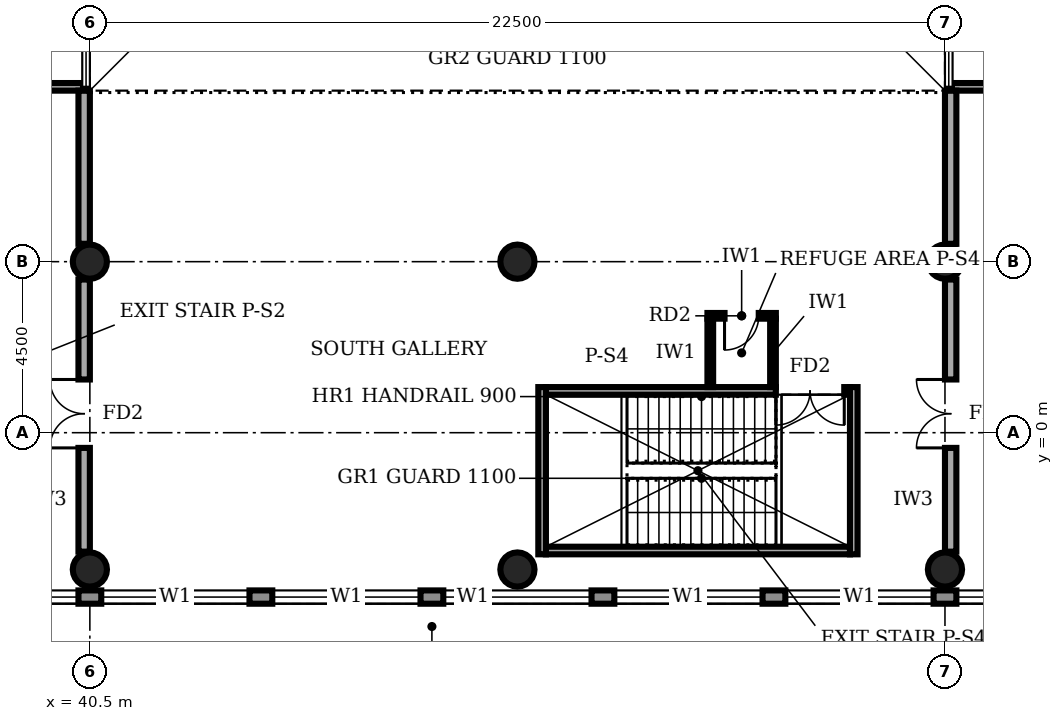
"""IFC4 building model, lengths in metres.
Left out: names, types, materials, properties, quantities, classifications, styles, units other than length and angle.
Written with IfcOpenShell. Run it as: python <this file> out.ifc"""

import sys

from ifc_helpers import new_model, si_unit, direction, frame, frame_2d, origin, origin_2d, place, context, subcontext, project, spatial, rectangle, circle, extrude, element, fill, save


model = new_model("IFC4")
c1 = context("Model", 3, precision=1e-05, world=origin(), true_north=direction((0.0, 1.0)))
c2 = subcontext(c1, "Body", "Model", "MODEL_VIEW")
j1 = project(units=[si_unit("LENGTHUNIT", "METRE"), si_unit("PLANEANGLEUNIT", "RADIAN")], contexts=[c1])
p1 = place(None, origin())
s1 = spatial("IfcSite", under=j1, at=p1, CompositionType="ELEMENT")
p2 = place(p1, origin())
s2 = spatial("IfcBuilding", under=s1, at=p2, CompositionType="ELEMENT")
p3 = place(p2, frame((0.0, 0.0, 11.0)))
s3 = spatial("IfcBuildingStorey", under=s2, at=p3, CompositionType="ELEMENT", Elevation=11.0)
for number, where, z_axis, x_axis in (
    (1, (40.5, -3.6, 0.0), (0.0, 0.0, 1.0), (1.0, 0.0, 0.0)),
    (2, (51.75, -3.6, 0.0), (0.0, 0.0, 1.0), (1.0, 0.0, 0.0)),
    (3, (63.0, -3.6, 0.0), (0.0, 0.0, 1.0), (1.0, 0.0, 0.0)),
    (4, (40.5, 4.5, 0.0), (0.0, 0.0, 1.0), (1.0, 0.0, 0.0)),
    (5, (51.75, 4.5, 0.0), (0.0, 0.0, 1.0), (1.0, 0.0, 0.0)),
    (6, (63.0, 4.5, 0.0), (0.0, 0.0, 1.0), (1.0, 0.0, 0.0)),
):
    element("IfcColumn", number, at=place(p3, frame(where, z_axis=z_axis, x_axis=x_axis)), inside=s3, PredefinedType="COLUMN", context=c2, shape_type="SweptSolid", body=[
        extrude(circle(Radius=0.45, at=origin_2d()), origin(), (0.0, 0.0, 1.0), 5.0),
    ])
p4 = place(p3, frame((0.02, -4.325, 0.0), z_axis=(0.0, 0.0, 1.0), x_axis=(1.0, 0.0, 0.0)))
e7 = element("IfcWall", 7, at=p4, inside=s3, PredefinedType="STANDARD", context=c2, shape_type="SweptSolid", body=[
    extrude(rectangle(XDim=98.96, YDim=0.35, at=frame_2d((49.48, 0.0))), origin(), (0.0, 0.0, 1.0), 4.7),
])
p5 = place(p4, frame((4.78, 0.0, 0.9)))
e8 = element("IfcOpeningElement", 8, at=p5, cuts=e7, PredefinedType="OPENING", context=c2, shape_type="SweptSolid", body=[
    extrude(rectangle(XDim=3.9, YDim=2.2, at=frame_2d((1.95, 1.1))), frame((0.0, 0.185, 0.0), z_axis=(0.0, -1.0, 0.0), x_axis=(1.0, 0.0, 0.0)), (0.0, 0.0, 1.0), 0.37),
])
p6 = place(p4, frame((9.28, 0.0, 0.9)))
e9 = element("IfcOpeningElement", 9, at=p6, cuts=e7, PredefinedType="OPENING", context=c2, shape_type="SweptSolid", body=[
    extrude(rectangle(XDim=3.9, YDim=2.2, at=frame_2d((1.95, 1.1))), frame((0.0, 0.185, 0.0), z_axis=(0.0, -1.0, 0.0), x_axis=(1.0, 0.0, 0.0)), (0.0, 0.0, 1.0), 0.37),
])
p7 = place(p4, frame((13.78, 0.0, 0.9)))
e10 = element("IfcOpeningElement", 10, at=p7, cuts=e7, PredefinedType="OPENING", context=c2, shape_type="SweptSolid", body=[
    extrude(rectangle(XDim=3.9, YDim=2.2, at=frame_2d((1.95, 1.1))), frame((0.0, 0.185, 0.0), z_axis=(0.0, -1.0, 0.0), x_axis=(1.0, 0.0, 0.0)), (0.0, 0.0, 1.0), 0.37),
])
p8 = place(p4, frame((18.28, 0.0, 0.9)))
e11 = element("IfcOpeningElement", 11, at=p8, cuts=e7, PredefinedType="OPENING", context=c2, shape_type="SweptSolid", body=[
    extrude(rectangle(XDim=3.9, YDim=2.2, at=frame_2d((1.95, 1.1))), frame((0.0, 0.185, 0.0), z_axis=(0.0, -1.0, 0.0), x_axis=(1.0, 0.0, 0.0)), (0.0, 0.0, 1.0), 0.37),
])
p9 = place(p4, frame((22.78, 0.0, 0.9)))
e12 = element("IfcOpeningElement", 12, at=p9, cuts=e7, PredefinedType="OPENING", context=c2, shape_type="SweptSolid", body=[
    extrude(rectangle(XDim=3.9, YDim=2.2, at=frame_2d((1.95, 1.1))), frame((0.0, 0.185, 0.0), z_axis=(0.0, -1.0, 0.0), x_axis=(1.0, 0.0, 0.0)), (0.0, 0.0, 1.0), 0.37),
])
p10 = place(p4, frame((27.28, 0.0, 0.9)))
e13 = element("IfcOpeningElement", 13, at=p10, cuts=e7, PredefinedType="OPENING", context=c2, shape_type="SweptSolid", body=[
    extrude(rectangle(XDim=3.9, YDim=2.2, at=frame_2d((1.95, 1.1))), frame((0.0, 0.185, 0.0), z_axis=(0.0, -1.0, 0.0), x_axis=(1.0, 0.0, 0.0)), (0.0, 0.0, 1.0), 0.37),
])
p11 = place(p4, frame((31.78, 0.0, 0.9)))
e14 = element("IfcOpeningElement", 14, at=p11, cuts=e7, PredefinedType="OPENING", context=c2, shape_type="SweptSolid", body=[
    extrude(rectangle(XDim=3.9, YDim=2.2, at=frame_2d((1.95, 1.1))), frame((0.0, 0.185, 0.0), z_axis=(0.0, -1.0, 0.0), x_axis=(1.0, 0.0, 0.0)), (0.0, 0.0, 1.0), 0.37),
])
p12 = place(p4, frame((36.28, 0.0, 0.9)))
e15 = element("IfcOpeningElement", 15, at=p12, cuts=e7, PredefinedType="OPENING", context=c2, shape_type="SweptSolid", body=[
    extrude(rectangle(XDim=3.9, YDim=2.2, at=frame_2d((1.95, 1.1))), frame((0.0, 0.185, 0.0), z_axis=(0.0, -1.0, 0.0), x_axis=(1.0, 0.0, 0.0)), (0.0, 0.0, 1.0), 0.37),
])
p13 = place(p4, frame((40.78, 0.0, 0.9)))
e16 = element("IfcOpeningElement", 16, at=p13, cuts=e7, PredefinedType="OPENING", context=c2, shape_type="SweptSolid", body=[
    extrude(rectangle(XDim=3.9, YDim=2.2, at=frame_2d((1.95, 1.1))), frame((0.0, 0.185, 0.0), z_axis=(0.0, -1.0, 0.0), x_axis=(1.0, 0.0, 0.0)), (0.0, 0.0, 1.0), 0.37),
])
p14 = place(p4, frame((45.28, 0.0, 0.9)))
e17 = element("IfcOpeningElement", 17, at=p14, cuts=e7, PredefinedType="OPENING", context=c2, shape_type="SweptSolid", body=[
    extrude(rectangle(XDim=3.9, YDim=2.2, at=frame_2d((1.95, 1.1))), frame((0.0, 0.185, 0.0), z_axis=(0.0, -1.0, 0.0), x_axis=(1.0, 0.0, 0.0)), (0.0, 0.0, 1.0), 0.37),
])
p15 = place(p4, frame((49.78, 0.0, 0.9)))
e18 = element("IfcOpeningElement", 18, at=p15, cuts=e7, PredefinedType="OPENING", context=c2, shape_type="SweptSolid", body=[
    extrude(rectangle(XDim=3.9, YDim=2.2, at=frame_2d((1.95, 1.1))), frame((0.0, 0.185, 0.0), z_axis=(0.0, -1.0, 0.0), x_axis=(1.0, 0.0, 0.0)), (0.0, 0.0, 1.0), 0.37),
])
p16 = place(p4, frame((54.28, 0.0, 0.9)))
e19 = element("IfcOpeningElement", 19, at=p16, cuts=e7, PredefinedType="OPENING", context=c2, shape_type="SweptSolid", body=[
    extrude(rectangle(XDim=3.9, YDim=2.2, at=frame_2d((1.95, 1.1))), frame((0.0, 0.185, 0.0), z_axis=(0.0, -1.0, 0.0), x_axis=(1.0, 0.0, 0.0)), (0.0, 0.0, 1.0), 0.37),
])
p17 = place(p4, frame((58.78, 0.0, 0.9)))
e20 = element("IfcOpeningElement", 20, at=p17, cuts=e7, PredefinedType="OPENING", context=c2, shape_type="SweptSolid", body=[
    extrude(rectangle(XDim=3.9, YDim=2.2, at=frame_2d((1.95, 1.1))), frame((0.0, 0.185, 0.0), z_axis=(0.0, -1.0, 0.0), x_axis=(1.0, 0.0, 0.0)), (0.0, 0.0, 1.0), 0.37),
])
p18 = place(p4, frame((63.28, 0.0, 0.9)))
e21 = element("IfcOpeningElement", 21, at=p18, cuts=e7, PredefinedType="OPENING", context=c2, shape_type="SweptSolid", body=[
    extrude(rectangle(XDim=3.9, YDim=2.2, at=frame_2d((1.95, 1.1))), frame((0.0, 0.185, 0.0), z_axis=(0.0, -1.0, 0.0), x_axis=(1.0, 0.0, 0.0)), (0.0, 0.0, 1.0), 0.37),
])
p19 = place(p4, frame((67.78, 0.0, 0.9)))
e22 = element("IfcOpeningElement", 22, at=p19, cuts=e7, PredefinedType="OPENING", context=c2, shape_type="SweptSolid", body=[
    extrude(rectangle(XDim=3.9, YDim=2.2, at=frame_2d((1.95, 1.1))), frame((0.0, 0.185, 0.0), z_axis=(0.0, -1.0, 0.0), x_axis=(1.0, 0.0, 0.0)), (0.0, 0.0, 1.0), 0.37),
])
p20 = place(p4, frame((72.28, 0.0, 0.9)))
e23 = element("IfcOpeningElement", 23, at=p20, cuts=e7, PredefinedType="OPENING", context=c2, shape_type="SweptSolid", body=[
    extrude(rectangle(XDim=3.9, YDim=2.2, at=frame_2d((1.95, 1.1))), frame((0.0, 0.185, 0.0), z_axis=(0.0, -1.0, 0.0), x_axis=(1.0, 0.0, 0.0)), (0.0, 0.0, 1.0), 0.37),
])
p21 = place(p4, frame((76.78, 0.0, 0.9)))
e24 = element("IfcOpeningElement", 24, at=p21, cuts=e7, PredefinedType="OPENING", context=c2, shape_type="SweptSolid", body=[
    extrude(rectangle(XDim=3.9, YDim=2.2, at=frame_2d((1.95, 1.1))), frame((0.0, 0.185, 0.0), z_axis=(0.0, -1.0, 0.0), x_axis=(1.0, 0.0, 0.0)), (0.0, 0.0, 1.0), 0.37),
])
p22 = place(p4, frame((81.28, 0.0, 0.9)))
e25 = element("IfcOpeningElement", 25, at=p22, cuts=e7, PredefinedType="OPENING", context=c2, shape_type="SweptSolid", body=[
    extrude(rectangle(XDim=3.9, YDim=2.2, at=frame_2d((1.95, 1.1))), frame((0.0, 0.185, 0.0), z_axis=(0.0, -1.0, 0.0), x_axis=(1.0, 0.0, 0.0)), (0.0, 0.0, 1.0), 0.37),
])
p23 = place(p4, frame((85.78, 0.0, 0.9)))
e26 = element("IfcOpeningElement", 26, at=p23, cuts=e7, PredefinedType="OPENING", context=c2, shape_type="SweptSolid", body=[
    extrude(rectangle(XDim=3.9, YDim=2.2, at=frame_2d((1.95, 1.1))), frame((0.0, 0.185, 0.0), z_axis=(0.0, -1.0, 0.0), x_axis=(1.0, 0.0, 0.0)), (0.0, 0.0, 1.0), 0.37),
])
p24 = place(p4, frame((90.28, 0.0, 0.9)))
e27 = element("IfcOpeningElement", 27, at=p24, cuts=e7, PredefinedType="OPENING", context=c2, shape_type="SweptSolid", body=[
    extrude(rectangle(XDim=3.9, YDim=2.2, at=frame_2d((1.95, 1.1))), frame((0.0, 0.185, 0.0), z_axis=(0.0, -1.0, 0.0), x_axis=(1.0, 0.0, 0.0)), (0.0, 0.0, 1.0), 0.37),
])
p25 = place(p4, frame((94.71, 0.0, 0.9)))
e28 = element("IfcOpeningElement", 28, at=p25, cuts=e7, PredefinedType="OPENING", context=c2, shape_type="SweptSolid", body=[
    extrude(rectangle(XDim=3.9, YDim=2.2, at=frame_2d((1.95, 1.1))), frame((0.0, 0.185, 0.0), z_axis=(0.0, -1.0, 0.0), x_axis=(1.0, 0.0, 0.0)), (0.0, 0.0, 1.0), 0.37),
])
p26 = place(p3, frame((28.8, 9.1, 0.0), z_axis=(0.0, 0.0, 1.0), x_axis=(1.0, 0.0, 0.0)))
e29 = element("IfcWall", 29, at=p26, inside=s3, PredefinedType="SOLIDWALL", context=c2, shape_type="SweptSolid", body=[
    extrude(rectangle(XDim=11.52, YDim=0.2, at=frame_2d((5.76, 0.0))), origin(), (0.0, 0.0, 1.0), 4.7),
])
p27 = place(p3, frame((63.18, 9.1, 0.0), z_axis=(0.0, 0.0, 1.0), x_axis=(1.0, 0.0, 0.0)))
e30 = element("IfcWall", 30, at=p27, inside=s3, PredefinedType="SOLIDWALL", context=c2, shape_type="SweptSolid", body=[
    extrude(rectangle(XDim=9.27, YDim=0.2, at=frame_2d((4.635, 0.0))), origin(), (0.0, 0.0, 1.0), 4.7),
])
p28 = place(p3, frame((52.5, 1.1, 0.0), z_axis=(0.0, 0.0, 1.0), x_axis=(1.0, 0.0, 0.0)))
e31 = element("IfcWall", 31, at=p28, inside=s3, PredefinedType="SOLIDWALL", context=c2, shape_type="SweptSolid", body=[
    extrude(rectangle(XDim=8.0, YDim=0.2, at=frame_2d((4.0, 0.0))), origin(), (0.0, 0.0, 1.0), 4.7),
])
p29 = place(p28, frame((6.05, 0.0, 0.0)))
e32 = element("IfcOpeningElement", 32, at=p29, cuts=e31, PredefinedType="OPENING", context=c2, shape_type="SweptSolid", body=[
    extrude(rectangle(XDim=1.8, YDim=2.1, at=frame_2d((0.9, 1.05))), frame((0.0, 0.11, 0.0), z_axis=(0.0, -1.0, 0.0), x_axis=(1.0, 0.0, 0.0)), (0.0, 0.0, 1.0), 0.22),
])
p30 = place(p3, frame((52.5, -3.1, 0.0), z_axis=(0.0, 0.0, 1.0), x_axis=(1.0, 0.0, 0.0)))
e33 = element("IfcWall", 33, at=p30, inside=s3, PredefinedType="SOLIDWALL", context=c2, shape_type="SweptSolid", body=[
    extrude(rectangle(XDim=8.0, YDim=0.2, at=frame_2d((4.0, 0.0))), origin(), (0.0, 0.0, 1.0), 4.7),
])
for number, where, z_axis, x_axis in (
    (34, (52.4, -3.2, 0.0), (0.0, 0.0, 1.0), (0.0, 1.0, 0.0)),
    (35, (60.6, -3.2, 0.0), (0.0, 0.0, 1.0), (0.0, 1.0, 0.0)),
):
    element("IfcWall", number, at=place(p3, frame(where, z_axis=z_axis, x_axis=x_axis)), inside=s3, PredefinedType="SOLIDWALL", context=c2, shape_type="SweptSolid", body=[
        extrude(rectangle(XDim=4.4, YDim=0.2, at=frame_2d((2.2, 0.0))), origin(), (0.0, 0.0, 1.0), 4.7),
    ])
p31 = place(p3, frame((40.35, -3.13, 0.0), z_axis=(0.0, 0.0, 1.0), x_axis=(0.0, 1.0, 0.0)))
e36 = element("IfcWall", 36, at=p31, inside=s3, PredefinedType="SOLIDWALL", context=c2, shape_type="SweptSolid", body=[
    extrude(rectangle(XDim=7.16, YDim=0.3, at=frame_2d((3.58, 0.0))), origin(), (0.0, 0.0, 1.0), 3.7),
])
p32 = place(p31, frame((2.73, 0.0, 0.0)))
e37 = element("IfcOpeningElement", 37, at=p32, cuts=e36, PredefinedType="OPENING", context=c2, shape_type="SweptSolid", body=[
    extrude(rectangle(XDim=1.8, YDim=2.1, at=frame_2d((0.9, 1.05))), frame((0.0, 0.16, 0.0), z_axis=(0.0, -1.0, 0.0), x_axis=(1.0, 0.0, 0.0)), (0.0, 0.0, 1.0), 0.32),
])
p33 = place(p3, frame((40.35, 4.97, 0.0), z_axis=(0.0, 0.0, 1.0), x_axis=(0.0, 1.0, 0.0)))
e38 = element("IfcWall", 38, at=p33, inside=s3, PredefinedType="SOLIDWALL", context=c2, shape_type="SweptSolid", body=[
    extrude(rectangle(XDim=4.03, YDim=0.3, at=frame_2d((2.015, 0.0))), origin(), (0.0, 0.0, 1.0), 4.7),
])
p34 = place(p3, frame((63.15, -3.13, 0.0), z_axis=(0.0, 0.0, 1.0), x_axis=(0.0, 1.0, 0.0)))
e39 = element("IfcWall", 39, at=p34, inside=s3, PredefinedType="SOLIDWALL", context=c2, shape_type="SweptSolid", body=[
    extrude(rectangle(XDim=7.16, YDim=0.3, at=frame_2d((3.58, 0.0))), origin(), (0.0, 0.0, 1.0), 3.7),
])
p35 = place(p34, frame((2.73, 0.0, 0.0)))
e40 = element("IfcOpeningElement", 40, at=p35, cuts=e39, PredefinedType="OPENING", context=c2, shape_type="SweptSolid", body=[
    extrude(rectangle(XDim=1.8, YDim=2.1, at=frame_2d((0.9, 1.05))), frame((0.0, 0.16, 0.0), z_axis=(0.0, -1.0, 0.0), x_axis=(1.0, 0.0, 0.0)), (0.0, 0.0, 1.0), 0.32),
])
p36 = place(p3, frame((63.15, 4.97, 0.0), z_axis=(0.0, 0.0, 1.0), x_axis=(0.0, 1.0, 0.0)))
e41 = element("IfcWall", 41, at=p36, inside=s3, PredefinedType="SOLIDWALL", context=c2, shape_type="SweptSolid", body=[
    extrude(rectangle(XDim=4.03, YDim=0.3, at=frame_2d((2.015, 0.0))), origin(), (0.0, 0.0, 1.0), 4.7),
])
p37 = place(p3, frame((58.475, 1.2, 0.0), z_axis=(0.0, 0.0, 1.0), x_axis=(0.0, 1.0, 0.0)))
e42 = element("IfcWall", 42, at=p37, inside=s3, PredefinedType="PARTITIONING", context=c2, shape_type="SweptSolid", body=[
    extrude(rectangle(XDim=1.8, YDim=0.15, at=frame_2d((0.9, 0.0))), origin(), (0.0, 0.0, 1.0), 4.7),
])
p38 = place(p3, frame((56.75, 3.075, 0.0), z_axis=(0.0, 0.0, 1.0), x_axis=(1.0, 0.0, 0.0)))
e43 = element("IfcWall", 43, at=p38, inside=s3, PredefinedType="PARTITIONING", context=c2, shape_type="SweptSolid", body=[
    extrude(rectangle(XDim=1.8, YDim=0.15, at=frame_2d((0.9, 0.0))), origin(), (0.0, 0.0, 1.0), 4.7),
])
p39 = place(p38, frame((0.45, 0.0, 0.0)))
e44 = element("IfcOpeningElement", 44, at=p39, cuts=e43, PredefinedType="OPENING", context=c2, shape_type="SweptSolid", body=[
    extrude(rectangle(XDim=0.9, YDim=2.1, at=frame_2d((0.45, 1.05))), frame((0.0, 0.085, 0.0), z_axis=(0.0, -1.0, 0.0), x_axis=(1.0, 0.0, 0.0)), (0.0, 0.0, 1.0), 0.17),
])
p40 = place(p3, frame((56.825, 1.2, 0.0), z_axis=(0.0, 0.0, 1.0), x_axis=(0.0, 1.0, 0.0)))
e45 = element("IfcWall", 45, at=p40, inside=s3, PredefinedType="PARTITIONING", context=c2, shape_type="SweptSolid", body=[
    extrude(rectangle(XDim=1.8, YDim=0.15, at=frame_2d((0.9, 0.0))), origin(), (0.0, 0.0, 1.0), 4.7),
])
p41 = place(p12, origin())
e46 = element("IfcWindow", 46, at=p41, inside=s3, PartitioningType="SINGLE_PANEL", PredefinedType="WINDOW", context=c2, shape_type="SweptSolid", body=[
    extrude(rectangle(XDim=3.9, YDim=2.2, at=frame_2d((1.95, 1.1))), frame((0.0, 0.03, 0.0), z_axis=(0.0, -1.0, 0.0), x_axis=(1.0, 0.0, 0.0)), (0.0, 0.0, 1.0), 0.06),
])
fill(e15, e46)
p42 = place(p13, origin())
e47 = element("IfcWindow", 47, at=p42, inside=s3, PartitioningType="SINGLE_PANEL", PredefinedType="WINDOW", context=c2, shape_type="SweptSolid", body=[
    extrude(rectangle(XDim=3.9, YDim=2.2, at=frame_2d((1.95, 1.1))), frame((0.0, 0.03, 0.0), z_axis=(0.0, -1.0, 0.0), x_axis=(1.0, 0.0, 0.0)), (0.0, 0.0, 1.0), 0.06),
])
fill(e16, e47)
p43 = place(p14, origin())
e48 = element("IfcWindow", 48, at=p43, inside=s3, PartitioningType="SINGLE_PANEL", PredefinedType="WINDOW", context=c2, shape_type="SweptSolid", body=[
    extrude(rectangle(XDim=3.9, YDim=2.2, at=frame_2d((1.95, 1.1))), frame((0.0, 0.03, 0.0), z_axis=(0.0, -1.0, 0.0), x_axis=(1.0, 0.0, 0.0)), (0.0, 0.0, 1.0), 0.06),
])
fill(e17, e48)
p44 = place(p15, origin())
e49 = element("IfcWindow", 49, at=p44, inside=s3, PartitioningType="SINGLE_PANEL", PredefinedType="WINDOW", context=c2, shape_type="SweptSolid", body=[
    extrude(rectangle(XDim=3.9, YDim=2.2, at=frame_2d((1.95, 1.1))), frame((0.0, 0.03, 0.0), z_axis=(0.0, -1.0, 0.0), x_axis=(1.0, 0.0, 0.0)), (0.0, 0.0, 1.0), 0.06),
])
fill(e18, e49)
p45 = place(p16, origin())
e50 = element("IfcWindow", 50, at=p45, inside=s3, PartitioningType="SINGLE_PANEL", PredefinedType="WINDOW", context=c2, shape_type="SweptSolid", body=[
    extrude(rectangle(XDim=3.9, YDim=2.2, at=frame_2d((1.95, 1.1))), frame((0.0, 0.03, 0.0), z_axis=(0.0, -1.0, 0.0), x_axis=(1.0, 0.0, 0.0)), (0.0, 0.0, 1.0), 0.06),
])
fill(e19, e50)
p46 = place(p17, origin())
e51 = element("IfcWindow", 51, at=p46, inside=s3, PartitioningType="SINGLE_PANEL", PredefinedType="WINDOW", context=c2, shape_type="SweptSolid", body=[
    extrude(rectangle(XDim=3.9, YDim=2.2, at=frame_2d((1.95, 1.1))), frame((0.0, 0.03, 0.0), z_axis=(0.0, -1.0, 0.0), x_axis=(1.0, 0.0, 0.0)), (0.0, 0.0, 1.0), 0.06),
])
fill(e20, e51)
p47 = place(p18, origin())
e52 = element("IfcWindow", 52, at=p47, inside=s3, PartitioningType="SINGLE_PANEL", PredefinedType="WINDOW", context=c2, shape_type="SweptSolid", body=[
    extrude(rectangle(XDim=3.9, YDim=2.2, at=frame_2d((1.95, 1.1))), frame((0.0, 0.03, 0.0), z_axis=(0.0, -1.0, 0.0), x_axis=(1.0, 0.0, 0.0)), (0.0, 0.0, 1.0), 0.06),
])
fill(e21, e52)
p48 = place(p29, frame((1.8, 0.0, 0.0), z_axis=(0.0, 0.0, 1.0), x_axis=(-1.0, 0.0, 0.0)))
e53 = element("IfcDoor", 53, at=p48, inside=s3, OperationType="DOUBLE_DOOR_SINGLE_SWING", PredefinedType="DOOR", context=c2, shape_type="SweptSolid", body=[
    extrude(rectangle(XDim=1.8, YDim=2.1, at=frame_2d((0.9, 1.05))), frame((0.0, 0.025, 0.0), z_axis=(0.0, -1.0, 0.0), x_axis=(1.0, 0.0, 0.0)), (0.0, 0.0, 1.0), 0.05),
])
fill(e32, e53)
p49 = place(p32, origin())
e54 = element("IfcDoor", 54, at=p49, inside=s3, OperationType="DOUBLE_DOOR_SINGLE_SWING", PredefinedType="DOOR", context=c2, shape_type="SweptSolid", body=[
    extrude(rectangle(XDim=1.8, YDim=2.1, at=frame_2d((0.9, 1.05))), frame((0.0, 0.025, 0.0), z_axis=(0.0, -1.0, 0.0), x_axis=(1.0, 0.0, 0.0)), (0.0, 0.0, 1.0), 0.05),
])
fill(e37, e54)
p50 = place(p35, origin())
e55 = element("IfcDoor", 55, at=p50, inside=s3, OperationType="DOUBLE_DOOR_SINGLE_SWING", PredefinedType="DOOR", context=c2, shape_type="SweptSolid", body=[
    extrude(rectangle(XDim=1.8, YDim=2.1, at=frame_2d((0.9, 1.05))), frame((0.0, 0.025, 0.0), z_axis=(0.0, -1.0, 0.0), x_axis=(1.0, 0.0, 0.0)), (0.0, 0.0, 1.0), 0.05),
])
fill(e40, e55)
p51 = place(p39, frame((0.9, 0.0, 0.0), z_axis=(0.0, 0.0, 1.0), x_axis=(-1.0, 0.0, 0.0)))
e56 = element("IfcDoor", 56, at=p51, inside=s3, OperationType="SINGLE_SWING_RIGHT", PredefinedType="DOOR", context=c2, shape_type="SweptSolid", body=[
    extrude(rectangle(XDim=0.9, YDim=2.1, at=frame_2d((0.45, 1.05))), frame((0.0, 0.025, 0.0), z_axis=(0.0, -1.0, 0.0), x_axis=(1.0, 0.0, 0.0)), (0.0, 0.0, 1.0), 0.05),
])
fill(e44, e56)
save(model, sys.argv[1])
